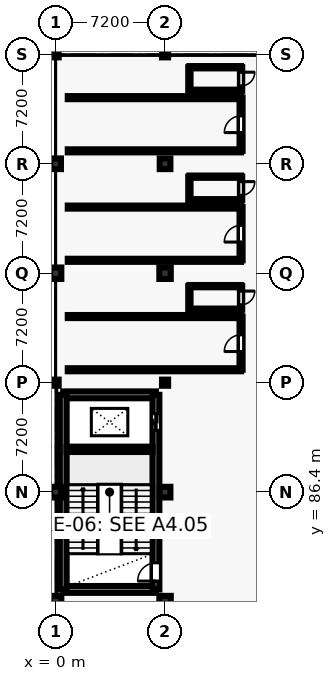
"""IFC4 building model, lengths in metres.
Left out: names, types, materials, properties, quantities, classifications, styles, units other than length and angle.
Written with IfcOpenShell. Run it as: python <this file> out.ifc"""

import sys

from ifc_helpers import new_model, si_unit, direction, frame, frame_2d, origin, origin_2d, place, context, subcontext, project, spatial, rectangle, hollow_rectangle, extrude, element, fill, save


model = new_model("IFC4")
c1 = context("Model", 3, precision=1e-05, world=origin(), true_north=direction((0.0, 1.0)))
c2 = subcontext(c1, "Body", "Model", "MODEL_VIEW")
j1 = project(units=[si_unit("LENGTHUNIT", "METRE"), si_unit("PLANEANGLEUNIT", "RADIAN")], contexts=[c1])
p1 = place(None, origin())
s1 = spatial("IfcSite", under=j1, at=p1, CompositionType="ELEMENT")
p2 = place(p1, origin())
s2 = spatial("IfcBuilding", under=s1, at=p2, CompositionType="ELEMENT")
p3 = place(p2, frame((0.0, 0.0, 9.6)))
s3 = spatial("IfcBuildingStorey", under=s2, at=p3, CompositionType="ELEMENT", Elevation=9.6)
p4 = place(p3, frame((0.0, 79.2, 0.0), z_axis=(0.0, 0.0, 1.0), x_axis=(1.0, 0.0, 0.0)))
e1 = element("IfcColumn", 1, at=p4, inside=s3, PredefinedType="COLUMN", context=c2, shape_type="SweptSolid", body=[
    extrude(rectangle(XDim=0.75, YDim=0.75, at=origin_2d()), origin(), (0.0, 0.0, 1.0), 4.2),
])
p5 = place(p3, frame((0.0, 86.4, 0.0), z_axis=(0.0, 0.0, 1.0), x_axis=(1.0, 0.0, 0.0)))
e2 = element("IfcColumn", 2, at=p5, inside=s3, PredefinedType="COLUMN", context=c2, shape_type="SweptSolid", body=[
    extrude(rectangle(XDim=0.7, YDim=0.7, at=origin_2d()), origin(), (0.0, 0.0, 1.0), 4.2),
])
p6 = place(p3, frame((0.0, 93.6, 0.0), z_axis=(0.0, 0.0, 1.0), x_axis=(1.0, 0.0, 0.0)))
e3 = element("IfcColumn", 3, at=p6, inside=s3, PredefinedType="COLUMN", context=c2, shape_type="SweptSolid", body=[
    extrude(hollow_rectangle(XDim=0.4, YDim=0.4, WallThickness=0.02, at=origin_2d()), origin(), (0.0, 0.0, 1.0), 4.2),
])
p7 = place(p3, frame((0.0, 100.8, 0.0), z_axis=(0.0, 0.0, 1.0), x_axis=(1.0, 0.0, 0.0)))
e4 = element("IfcColumn", 4, at=p7, inside=s3, PredefinedType="COLUMN", context=c2, shape_type="SweptSolid", body=[
    extrude(rectangle(XDim=0.75, YDim=0.75, at=origin_2d()), origin(), (0.0, 0.0, 1.0), 4.2),
])
p8 = place(p3, frame((0.0, 108.0, 0.0), z_axis=(0.0, 0.0, 1.0), x_axis=(1.0, 0.0, 0.0)))
e5 = element("IfcColumn", 5, at=p8, inside=s3, PredefinedType="COLUMN", context=c2, shape_type="SweptSolid", body=[
    extrude(rectangle(XDim=0.7, YDim=0.7, at=origin_2d()), origin(), (0.0, 0.0, 1.0), 4.2),
])
p9 = place(p3, frame((0.0, 115.2, 0.0), z_axis=(0.0, 0.0, 1.0), x_axis=(1.0, 0.0, 0.0)))
e6 = element("IfcColumn", 6, at=p9, inside=s3, PredefinedType="COLUMN", context=c2, shape_type="SweptSolid", body=[
    extrude(hollow_rectangle(XDim=0.4, YDim=0.4, WallThickness=0.02, at=origin_2d()), origin(), (0.0, 0.0, 1.0), 4.2),
])
p10 = place(p3, frame((7.2, 79.2, 0.0), z_axis=(0.0, 0.0, 1.0), x_axis=(1.0, 0.0, 0.0)))
e7 = element("IfcColumn", 7, at=p10, inside=s3, PredefinedType="COLUMN", context=c2, shape_type="SweptSolid", body=[
    extrude(rectangle(XDim=0.75, YDim=0.75, at=origin_2d()), origin(), (0.0, 0.0, 1.0), 4.2),
])
p11 = place(p3, frame((7.2, 86.4, 0.0), z_axis=(0.0, 0.0, 1.0), x_axis=(1.0, 0.0, 0.0)))
e8 = element("IfcColumn", 8, at=p11, inside=s3, PredefinedType="COLUMN", context=c2, shape_type="SweptSolid", body=[
    extrude(rectangle(XDim=0.7, YDim=0.7, at=origin_2d()), origin(), (0.0, 0.0, 1.0), 4.2),
])
p12 = place(p3, frame((7.2, 93.6, 0.0), z_axis=(0.0, 0.0, 1.0), x_axis=(1.0, 0.0, 0.0)))
e9 = element("IfcColumn", 9, at=p12, inside=s3, PredefinedType="COLUMN", context=c2, shape_type="SweptSolid", body=[
    extrude(hollow_rectangle(XDim=0.4, YDim=0.4, WallThickness=0.02, at=origin_2d()), origin(), (0.0, 0.0, 1.0), 4.2),
])
p13 = place(p3, frame((7.2, 100.8, 0.0), z_axis=(0.0, 0.0, 1.0), x_axis=(1.0, 0.0, 0.0)))
e10 = element("IfcColumn", 10, at=p13, inside=s3, PredefinedType="COLUMN", context=c2, shape_type="SweptSolid", body=[
    extrude(rectangle(XDim=0.75, YDim=0.75, at=origin_2d()), origin(), (0.0, 0.0, 1.0), 4.2),
])
p14 = place(p3, frame((7.2, 108.0, 0.0), z_axis=(0.0, 0.0, 1.0), x_axis=(1.0, 0.0, 0.0)))
e11 = element("IfcColumn", 11, at=p14, inside=s3, PredefinedType="COLUMN", context=c2, shape_type="SweptSolid", body=[
    extrude(rectangle(XDim=0.7, YDim=0.7, at=origin_2d()), origin(), (0.0, 0.0, 1.0), 4.2),
])
p15 = place(p3, frame((7.2, 115.2, 0.0), z_axis=(0.0, 0.0, 1.0), x_axis=(1.0, 0.0, 0.0)))
e12 = element("IfcColumn", 12, at=p15, inside=s3, PredefinedType="COLUMN", context=c2, shape_type="SweptSolid", body=[
    extrude(hollow_rectangle(XDim=0.4, YDim=0.4, WallThickness=0.02, at=origin_2d()), origin(), (0.0, 0.0, 1.0), 4.2),
])
for number, where, z_axis, x_axis in (
    (13, (0.5, 80.0, 0.0), (0.0, 0.0, 1.0), (1.0, 0.0, 0.0)),
    (14, (0.5, 92.8, 0.0), (0.0, 0.0, 1.0), (1.0, 0.0, 0.0)),
):
    element("IfcWall", number, at=place(p3, frame(where, z_axis=z_axis, x_axis=x_axis)), inside=s3, PredefinedType="SHEAR", context=c2, shape_type="SweptSolid", body=[
        extrude(rectangle(XDim=6.1, YDim=0.45, at=frame_2d((3.05, 0.0))), origin(), (0.0, 0.0, 1.0), 3.88),
    ])
p16 = place(p3, frame((0.5, 80.0, 0.0), z_axis=(0.0, 0.0, 1.0), x_axis=(0.0, 1.0, 0.0)))
e15 = element("IfcWall", 15, at=p16, inside=s3, PredefinedType="SHEAR", context=c2, shape_type="SweptSolid", body=[
    extrude(rectangle(XDim=12.8, YDim=0.45, at=frame_2d((6.4, 0.0))), origin(), (0.0, 0.0, 1.0), 3.88),
])
p17 = place(p3, frame((6.6, 80.0, 0.0), z_axis=(0.0, 0.0, 1.0), x_axis=(0.0, 1.0, 0.0)))
e16 = element("IfcWall", 16, at=p17, inside=s3, PredefinedType="SHEAR", context=c2, shape_type="SweptSolid", body=[
    extrude(rectangle(XDim=12.8, YDim=0.45, at=frame_2d((6.4, 0.0))), origin(), (0.0, 0.0, 1.0), 3.88),
])
p18 = place(p17, frame((0.55, 0.0, 0.0)))
e17 = element("IfcOpeningElement", 17, at=p18, cuts=e16, PredefinedType="OPENING", context=c2, shape_type="SweptSolid", body=[
    extrude(rectangle(XDim=1.2, YDim=2.25, at=frame_2d((0.6, 1.125))), frame((0.0, 0.235, 0.0), z_axis=(0.0, -1.0, 0.0), x_axis=(1.0, 0.0, 0.0)), (0.0, 0.0, 1.0), 0.47),
])
p19 = place(p17, frame((10.458, 0.0, 0.0)))
e18 = element("IfcOpeningElement", 18, at=p19, cuts=e16, PredefinedType="OPENING", context=c2, shape_type="SweptSolid", body=[
    extrude(rectangle(XDim=1.1, YDim=2.2, at=frame_2d((0.55, 1.1))), frame((0.0, 0.235, 0.0), z_axis=(0.0, -1.0, 0.0), x_axis=(1.0, 0.0, 0.0)), (0.0, 0.0, 1.0), 0.47),
])
p20 = place(p3, frame((0.725, 89.216, 0.0), z_axis=(0.0, 0.0, 1.0), x_axis=(1.0, 0.0, 0.0)))
e19 = element("IfcWall", 19, at=p20, inside=s3, PredefinedType="SHEAR", context=c2, shape_type="SweptSolid", body=[
    extrude(rectangle(XDim=5.65, YDim=0.35, at=frame_2d((2.825, 0.0))), origin(), (0.0, 0.0, 1.0), 3.88),
])
p21 = place(p3, frame((0.8, 94.45, 0.0), z_axis=(0.0, 0.0, 1.0), x_axis=(1.0, 0.0, 0.0)))
e20 = element("IfcWall", 20, at=p21, inside=s3, PredefinedType="PARTITIONING", context=c2, shape_type="SweptSolid", body=[
    extrude(rectangle(XDim=11.4, YDim=0.2, at=frame_2d((5.7, 0.0))), origin(), (0.0, 0.0, 1.0), 2.94),
])
p22 = place(p3, frame((12.2, 94.45, 0.0), z_axis=(0.0, 0.0, 1.0), x_axis=(0.0, 1.0, 0.0)))
e21 = element("IfcWall", 21, at=p22, inside=s3, PredefinedType="PARTITIONING", context=c2, shape_type="SweptSolid", body=[
    extrude(rectangle(XDim=3.5, YDim=0.2, at=frame_2d((1.75, 0.0))), origin(), (0.0, 0.0, 1.0), 2.94),
])
p23 = place(p22, frame((1.2, 0.0, 0.0)))
e22 = element("IfcOpeningElement", 22, at=p23, cuts=e21, PredefinedType="OPENING", context=c2, shape_type="SweptSolid", body=[
    extrude(rectangle(XDim=1.1, YDim=2.25, at=frame_2d((0.55, 1.125))), frame((0.0, 0.11, 0.0), z_axis=(0.0, -1.0, 0.0), x_axis=(1.0, 0.0, 0.0)), (0.0, 0.0, 1.0), 0.22),
])
p24 = place(p3, frame((12.2, 97.95, 0.0), z_axis=(0.0, 0.0, 1.0), x_axis=(-1.0, 0.0, 0.0)))
e23 = element("IfcWall", 23, at=p24, inside=s3, PredefinedType="PARTITIONING", context=c2, shape_type="SweptSolid", body=[
    extrude(rectangle(XDim=11.4, YDim=0.2, at=frame_2d((5.7, 0.0))), origin(), (0.0, 0.0, 1.0), 2.94),
])
p25 = place(p3, frame((8.8, 98.4, 0.0), z_axis=(0.0, 0.0, 1.0), x_axis=(1.0, 0.0, 0.0)))
e24 = element("IfcWall", 24, at=p25, inside=s3, PredefinedType="PARTITIONING", context=c2, shape_type="SweptSolid", body=[
    extrude(rectangle(XDim=3.4, YDim=0.15, at=frame_2d((1.7, 0.0))), origin(), (0.0, 0.0, 1.0), 2.94),
])
p26 = place(p3, frame((12.2, 98.4, 0.0), z_axis=(0.0, 0.0, 1.0), x_axis=(0.0, 1.0, 0.0)))
e25 = element("IfcWall", 25, at=p26, inside=s3, PredefinedType="PARTITIONING", context=c2, shape_type="SweptSolid", body=[
    extrude(rectangle(XDim=1.55, YDim=0.15, at=frame_2d((0.775, 0.0))), origin(), (0.0, 0.0, 1.0), 2.94),
])
p27 = place(p26, frame((0.325, 0.0, 0.0)))
e26 = element("IfcOpeningElement", 26, at=p27, cuts=e25, PredefinedType="OPENING", context=c2, shape_type="SweptSolid", body=[
    extrude(rectangle(XDim=0.9, YDim=2.15, at=frame_2d((0.45, 1.075))), frame((0.0, 0.085, 0.0), z_axis=(0.0, -1.0, 0.0), x_axis=(1.0, 0.0, 0.0)), (0.0, 0.0, 1.0), 0.17),
])
p28 = place(p3, frame((12.2, 99.95, 0.0), z_axis=(0.0, 0.0, 1.0), x_axis=(-1.0, 0.0, 0.0)))
e27 = element("IfcWall", 27, at=p28, inside=s3, PredefinedType="PARTITIONING", context=c2, shape_type="SweptSolid", body=[
    extrude(rectangle(XDim=3.4, YDim=0.15, at=frame_2d((1.7, 0.0))), origin(), (0.0, 0.0, 1.0), 2.94),
])
p29 = place(p3, frame((8.8, 99.95, 0.0), z_axis=(0.0, 0.0, 1.0), x_axis=(0.0, -1.0, 0.0)))
e28 = element("IfcWall", 28, at=p29, inside=s3, PredefinedType="PARTITIONING", context=c2, shape_type="SweptSolid", body=[
    extrude(rectangle(XDim=1.55, YDim=0.15, at=frame_2d((0.775, 0.0))), origin(), (0.0, 0.0, 1.0), 2.94),
])
p30 = place(p3, frame((0.8, 101.65, 0.0), z_axis=(0.0, 0.0, 1.0), x_axis=(1.0, 0.0, 0.0)))
e29 = element("IfcWall", 29, at=p30, inside=s3, PredefinedType="PARTITIONING", context=c2, shape_type="SweptSolid", body=[
    extrude(rectangle(XDim=11.4, YDim=0.2, at=frame_2d((5.7, 0.0))), origin(), (0.0, 0.0, 1.0), 2.94),
])
p31 = place(p3, frame((12.2, 101.65, 0.0), z_axis=(0.0, 0.0, 1.0), x_axis=(0.0, 1.0, 0.0)))
e30 = element("IfcWall", 30, at=p31, inside=s3, PredefinedType="PARTITIONING", context=c2, shape_type="SweptSolid", body=[
    extrude(rectangle(XDim=3.5, YDim=0.2, at=frame_2d((1.75, 0.0))), origin(), (0.0, 0.0, 1.0), 2.94),
])
p32 = place(p31, frame((1.2, 0.0, 0.0)))
e31 = element("IfcOpeningElement", 31, at=p32, cuts=e30, PredefinedType="OPENING", context=c2, shape_type="SweptSolid", body=[
    extrude(rectangle(XDim=1.1, YDim=2.25, at=frame_2d((0.55, 1.125))), frame((0.0, 0.11, 0.0), z_axis=(0.0, -1.0, 0.0), x_axis=(1.0, 0.0, 0.0)), (0.0, 0.0, 1.0), 0.22),
])
p33 = place(p3, frame((12.2, 105.15, 0.0), z_axis=(0.0, 0.0, 1.0), x_axis=(-1.0, 0.0, 0.0)))
e32 = element("IfcWall", 32, at=p33, inside=s3, PredefinedType="PARTITIONING", context=c2, shape_type="SweptSolid", body=[
    extrude(rectangle(XDim=11.4, YDim=0.2, at=frame_2d((5.7, 0.0))), origin(), (0.0, 0.0, 1.0), 2.94),
])
p34 = place(p3, frame((8.8, 105.6, 0.0), z_axis=(0.0, 0.0, 1.0), x_axis=(1.0, 0.0, 0.0)))
e33 = element("IfcWall", 33, at=p34, inside=s3, PredefinedType="PARTITIONING", context=c2, shape_type="SweptSolid", body=[
    extrude(rectangle(XDim=3.4, YDim=0.15, at=frame_2d((1.7, 0.0))), origin(), (0.0, 0.0, 1.0), 2.94),
])
p35 = place(p3, frame((12.2, 105.6, 0.0), z_axis=(0.0, 0.0, 1.0), x_axis=(0.0, 1.0, 0.0)))
e34 = element("IfcWall", 34, at=p35, inside=s3, PredefinedType="PARTITIONING", context=c2, shape_type="SweptSolid", body=[
    extrude(rectangle(XDim=1.55, YDim=0.15, at=frame_2d((0.775, 0.0))), origin(), (0.0, 0.0, 1.0), 2.94),
])
p36 = place(p35, frame((0.325, 0.0, 0.0)))
e35 = element("IfcOpeningElement", 35, at=p36, cuts=e34, PredefinedType="OPENING", context=c2, shape_type="SweptSolid", body=[
    extrude(rectangle(XDim=0.9, YDim=2.15, at=frame_2d((0.45, 1.075))), frame((0.0, 0.085, 0.0), z_axis=(0.0, -1.0, 0.0), x_axis=(1.0, 0.0, 0.0)), (0.0, 0.0, 1.0), 0.17),
])
p37 = place(p3, frame((12.2, 107.15, 0.0), z_axis=(0.0, 0.0, 1.0), x_axis=(-1.0, 0.0, 0.0)))
e36 = element("IfcWall", 36, at=p37, inside=s3, PredefinedType="PARTITIONING", context=c2, shape_type="SweptSolid", body=[
    extrude(rectangle(XDim=3.4, YDim=0.15, at=frame_2d((1.7, 0.0))), origin(), (0.0, 0.0, 1.0), 2.94),
])
p38 = place(p3, frame((8.8, 107.15, 0.0), z_axis=(0.0, 0.0, 1.0), x_axis=(0.0, -1.0, 0.0)))
e37 = element("IfcWall", 37, at=p38, inside=s3, PredefinedType="PARTITIONING", context=c2, shape_type="SweptSolid", body=[
    extrude(rectangle(XDim=1.55, YDim=0.15, at=frame_2d((0.775, 0.0))), origin(), (0.0, 0.0, 1.0), 2.94),
])
p39 = place(p3, frame((0.8, 108.85, 0.0), z_axis=(0.0, 0.0, 1.0), x_axis=(1.0, 0.0, 0.0)))
e38 = element("IfcWall", 38, at=p39, inside=s3, PredefinedType="PARTITIONING", context=c2, shape_type="SweptSolid", body=[
    extrude(rectangle(XDim=11.4, YDim=0.2, at=frame_2d((5.7, 0.0))), origin(), (0.0, 0.0, 1.0), 2.94),
])
p40 = place(p3, frame((12.2, 108.85, 0.0), z_axis=(0.0, 0.0, 1.0), x_axis=(0.0, 1.0, 0.0)))
e39 = element("IfcWall", 39, at=p40, inside=s3, PredefinedType="PARTITIONING", context=c2, shape_type="SweptSolid", body=[
    extrude(rectangle(XDim=3.5, YDim=0.2, at=frame_2d((1.75, 0.0))), origin(), (0.0, 0.0, 1.0), 2.94),
])
p41 = place(p40, frame((1.2, 0.0, 0.0)))
e40 = element("IfcOpeningElement", 40, at=p41, cuts=e39, PredefinedType="OPENING", context=c2, shape_type="SweptSolid", body=[
    extrude(rectangle(XDim=1.1, YDim=2.25, at=frame_2d((0.55, 1.125))), frame((0.0, 0.11, 0.0), z_axis=(0.0, -1.0, 0.0), x_axis=(1.0, 0.0, 0.0)), (0.0, 0.0, 1.0), 0.22),
])
p42 = place(p3, frame((12.2, 112.35, 0.0), z_axis=(0.0, 0.0, 1.0), x_axis=(-1.0, 0.0, 0.0)))
e41 = element("IfcWall", 41, at=p42, inside=s3, PredefinedType="PARTITIONING", context=c2, shape_type="SweptSolid", body=[
    extrude(rectangle(XDim=11.4, YDim=0.2, at=frame_2d((5.7, 0.0))), origin(), (0.0, 0.0, 1.0), 2.94),
])
p43 = place(p3, frame((8.8, 112.8, 0.0), z_axis=(0.0, 0.0, 1.0), x_axis=(1.0, 0.0, 0.0)))
e42 = element("IfcWall", 42, at=p43, inside=s3, PredefinedType="PARTITIONING", context=c2, shape_type="SweptSolid", body=[
    extrude(rectangle(XDim=3.4, YDim=0.15, at=frame_2d((1.7, 0.0))), origin(), (0.0, 0.0, 1.0), 2.94),
])
p44 = place(p3, frame((12.2, 112.8, 0.0), z_axis=(0.0, 0.0, 1.0), x_axis=(0.0, 1.0, 0.0)))
e43 = element("IfcWall", 43, at=p44, inside=s3, PredefinedType="PARTITIONING", context=c2, shape_type="SweptSolid", body=[
    extrude(rectangle(XDim=1.55, YDim=0.15, at=frame_2d((0.775, 0.0))), origin(), (0.0, 0.0, 1.0), 2.94),
])
p45 = place(p44, frame((0.325, 0.0, 0.0)))
e44 = element("IfcOpeningElement", 44, at=p45, cuts=e43, PredefinedType="OPENING", context=c2, shape_type="SweptSolid", body=[
    extrude(rectangle(XDim=0.9, YDim=2.15, at=frame_2d((0.45, 1.075))), frame((0.0, 0.085, 0.0), z_axis=(0.0, -1.0, 0.0), x_axis=(1.0, 0.0, 0.0)), (0.0, 0.0, 1.0), 0.17),
])
p46 = place(p3, frame((12.2, 114.35, 0.0), z_axis=(0.0, 0.0, 1.0), x_axis=(-1.0, 0.0, 0.0)))
e45 = element("IfcWall", 45, at=p46, inside=s3, PredefinedType="PARTITIONING", context=c2, shape_type="SweptSolid", body=[
    extrude(rectangle(XDim=3.4, YDim=0.15, at=frame_2d((1.7, 0.0))), origin(), (0.0, 0.0, 1.0), 2.94),
])
p47 = place(p3, frame((8.8, 114.35, 0.0), z_axis=(0.0, 0.0, 1.0), x_axis=(0.0, -1.0, 0.0)))
e46 = element("IfcWall", 46, at=p47, inside=s3, PredefinedType="PARTITIONING", context=c2, shape_type="SweptSolid", body=[
    extrude(rectangle(XDim=1.55, YDim=0.15, at=frame_2d((0.775, 0.0))), origin(), (0.0, 0.0, 1.0), 2.94),
])
p48 = place(p18, origin())
e47 = element("IfcDoor", 47, at=p48, inside=s3, OperationType="SINGLE_SWING_LEFT", PredefinedType="DOOR", context=c2, shape_type="SweptSolid", body=[
    extrude(rectangle(XDim=1.2, YDim=2.25, at=frame_2d((0.6, 1.125))), frame((0.0, 0.025, 0.0), z_axis=(0.0, -1.0, 0.0), x_axis=(1.0, 0.0, 0.0)), (0.0, 0.0, 1.0), 0.05),
])
fill(e17, e47)
p49 = place(p19, origin())
e48 = element("IfcDoor", 48, at=p49, inside=s3, OperationType="SLIDING_TO_RIGHT", PredefinedType="DOOR", context=c2, shape_type="SweptSolid", body=[
    extrude(rectangle(XDim=1.1, YDim=2.2, at=frame_2d((0.55, 1.1))), frame((0.0, 0.025, 0.0), z_axis=(0.0, -1.0, 0.0), x_axis=(1.0, 0.0, 0.0)), (0.0, 0.0, 1.0), 0.05),
])
fill(e18, e48)
p50 = place(p23, origin())
e49 = element("IfcDoor", 49, at=p50, inside=s3, OperationType="SINGLE_SWING_LEFT", PredefinedType="DOOR", context=c2, shape_type="SweptSolid", body=[
    extrude(rectangle(XDim=1.1, YDim=2.25, at=frame_2d((0.55, 1.125))), frame((0.0, 0.025, 0.0), z_axis=(0.0, -1.0, 0.0), x_axis=(1.0, 0.0, 0.0)), (0.0, 0.0, 1.0), 0.05),
])
fill(e22, e49)
p51 = place(p27, frame((0.9, 0.0, 0.0), z_axis=(0.0, 0.0, 1.0), x_axis=(-1.0, 0.0, 0.0)))
e50 = element("IfcDoor", 50, at=p51, inside=s3, OperationType="SINGLE_SWING_RIGHT", PredefinedType="DOOR", context=c2, shape_type="SweptSolid", body=[
    extrude(rectangle(XDim=0.9, YDim=2.15, at=frame_2d((0.45, 1.075))), frame((0.0, 0.025, 0.0), z_axis=(0.0, -1.0, 0.0), x_axis=(1.0, 0.0, 0.0)), (0.0, 0.0, 1.0), 0.05),
])
fill(e26, e50)
p52 = place(p32, origin())
e51 = element("IfcDoor", 51, at=p52, inside=s3, OperationType="SINGLE_SWING_LEFT", PredefinedType="DOOR", context=c2, shape_type="SweptSolid", body=[
    extrude(rectangle(XDim=1.1, YDim=2.25, at=frame_2d((0.55, 1.125))), frame((0.0, 0.025, 0.0), z_axis=(0.0, -1.0, 0.0), x_axis=(1.0, 0.0, 0.0)), (0.0, 0.0, 1.0), 0.05),
])
fill(e31, e51)
p53 = place(p36, frame((0.9, 0.0, 0.0), z_axis=(0.0, 0.0, 1.0), x_axis=(-1.0, 0.0, 0.0)))
e52 = element("IfcDoor", 52, at=p53, inside=s3, OperationType="SINGLE_SWING_RIGHT", PredefinedType="DOOR", context=c2, shape_type="SweptSolid", body=[
    extrude(rectangle(XDim=0.9, YDim=2.15, at=frame_2d((0.45, 1.075))), frame((0.0, 0.025, 0.0), z_axis=(0.0, -1.0, 0.0), x_axis=(1.0, 0.0, 0.0)), (0.0, 0.0, 1.0), 0.05),
])
fill(e35, e52)
p54 = place(p41, origin())
e53 = element("IfcDoor", 53, at=p54, inside=s3, OperationType="SINGLE_SWING_LEFT", PredefinedType="DOOR", context=c2, shape_type="SweptSolid", body=[
    extrude(rectangle(XDim=1.1, YDim=2.25, at=frame_2d((0.55, 1.125))), frame((0.0, 0.025, 0.0), z_axis=(0.0, -1.0, 0.0), x_axis=(1.0, 0.0, 0.0)), (0.0, 0.0, 1.0), 0.05),
])
fill(e40, e53)
p55 = place(p45, frame((0.9, 0.0, 0.0), z_axis=(0.0, 0.0, 1.0), x_axis=(-1.0, 0.0, 0.0)))
e54 = element("IfcDoor", 54, at=p55, inside=s3, OperationType="SINGLE_SWING_RIGHT", PredefinedType="DOOR", context=c2, shape_type="SweptSolid", body=[
    extrude(rectangle(XDim=0.9, YDim=2.15, at=frame_2d((0.45, 1.075))), frame((0.0, 0.025, 0.0), z_axis=(0.0, -1.0, 0.0), x_axis=(1.0, 0.0, 0.0)), (0.0, 0.0, 1.0), 0.05),
])
fill(e44, e54)
save(model, sys.argv[1])
